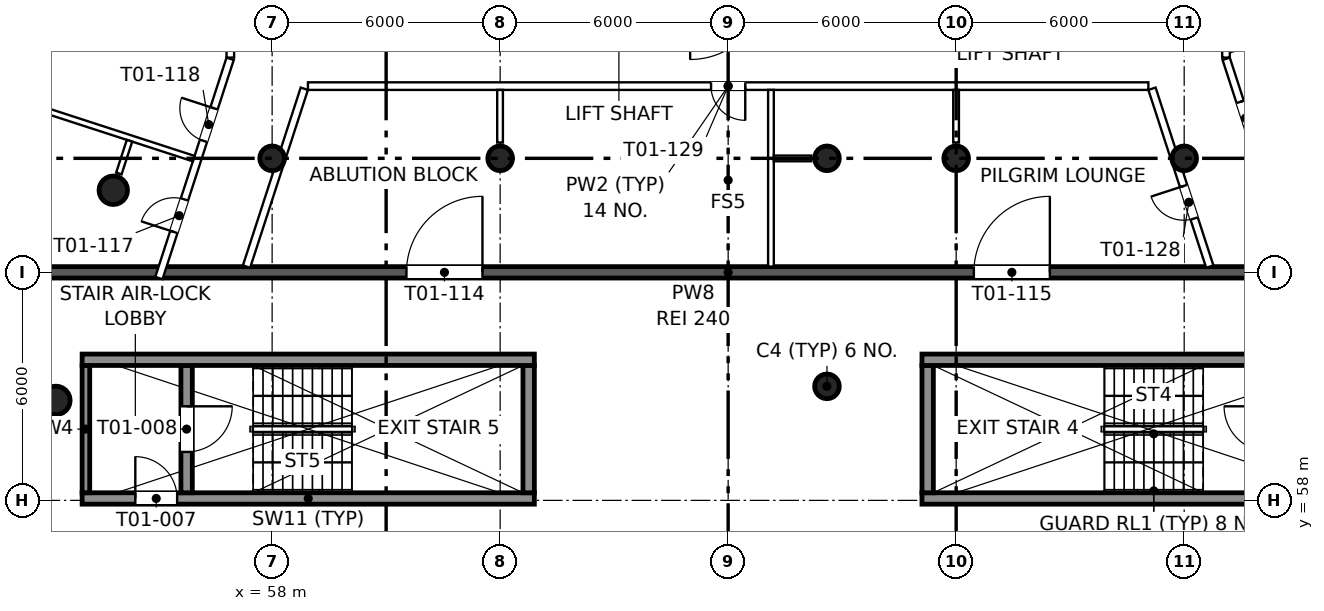
"""IFC4 building model, lengths in metres.
Left out: names, types, materials, properties, quantities, classifications, styles, units other than length and angle.
Written with IfcOpenShell. Run it as: python <this file> out.ifc"""

import sys

from ifc_helpers import new_model, si_unit, direction, frame, frame_2d, origin, origin_2d, place, context, subcontext, project, spatial, rectangle, circle, extrude, element, fill, save


model = new_model("IFC4")
c1 = context("Model", 3, precision=1e-05, world=origin(), true_north=direction((0.0, 1.0)))
c2 = subcontext(c1, "Body", "Model", "MODEL_VIEW")
j1 = project(units=[si_unit("LENGTHUNIT", "METRE"), si_unit("PLANEANGLEUNIT", "RADIAN")], contexts=[c1])
p1 = place(None, origin())
s1 = spatial("IfcSite", under=j1, at=p1, CompositionType="ELEMENT")
p2 = place(p1, origin())
s2 = spatial("IfcBuilding", under=s1, at=p2, CompositionType="ELEMENT")
p3 = place(p2, frame((0.0, 0.0, 39.0)))
s3 = spatial("IfcBuildingStorey", under=s2, at=p3, CompositionType="ELEMENT", Elevation=39.0)
for number, where, z_axis, x_axis in (
    (1, (52.31, 60.63, 0.0), (0.0, 0.0, 1.0), (1.0, 0.0, 0.0)),
    (2, (53.82, 66.16, 0.0), (0.0, 0.0, 1.0), (1.0, 0.0, 0.0)),
):
    element("IfcColumn", number, at=place(p3, frame(where, z_axis=z_axis, x_axis=x_axis)), inside=s3, PredefinedType="COLUMN", context=c2, shape_type="SweptSolid", body=[
        extrude(circle(Radius=0.375, at=origin_2d()), origin(), (0.0, 0.0, 1.0), 3.9),
    ])
for number, where, z_axis, x_axis in (
    (3, (58.0, 67.0, 0.0), (0.0, 0.0, 1.0), (1.0, 0.0, 0.0)),
    (4, (64.0, 67.0, 0.0), (0.0, 0.0, 1.0), (1.0, 0.0, 0.0)),
    (5, (72.6, 61.0, 0.0), (0.0, 0.0, 1.0), (1.0, 0.0, 0.0)),
    (6, (72.6, 67.0, 0.0), (0.0, 0.0, 1.0), (1.0, 0.0, 0.0)),
    (7, (76.0, 67.0, 0.0), (0.0, 0.0, 1.0), (1.0, 0.0, 0.0)),
    (8, (82.0, 67.0, 0.0), (0.0, 0.0, 1.0), (1.0, 0.0, 0.0)),
):
    element("IfcColumn", number, at=place(p3, frame(where, z_axis=z_axis, x_axis=x_axis)), inside=s3, PredefinedType="COLUMN", context=c2, shape_type="SweptSolid", body=[
        extrude(circle(Radius=0.325, at=origin_2d()), origin(), (0.0, 0.0, 1.0), 3.9),
    ])
p4 = place(p3, frame((53.0, 58.05, 0.0), z_axis=(0.0, 0.0, 1.0), x_axis=(1.0, 0.0, 0.0)))
e9 = element("IfcWall", 9, at=p4, inside=s3, PredefinedType="SHEAR", context=c2, shape_type="SweptSolid", body=[
    extrude(rectangle(XDim=11.9, YDim=0.3, at=frame_2d((5.95, 0.0))), origin(), (0.0, 0.0, 1.0), 3.9),
])
p5 = place(p4, frame((1.4, 0.0, 0.0)))
e10 = element("IfcOpeningElement", 10, at=p5, cuts=e9, PredefinedType="OPENING", context=c2, shape_type="SweptSolid", body=[
    extrude(rectangle(XDim=1.1, YDim=2.1, at=frame_2d((0.55, 1.05))), frame((0.0, 0.16, 0.0), z_axis=(0.0, -1.0, 0.0), x_axis=(1.0, 0.0, 0.0)), (0.0, 0.0, 1.0), 0.32),
])
p6 = place(p3, frame((75.1, 58.05, 0.0), z_axis=(0.0, 0.0, 1.0), x_axis=(1.0, 0.0, 0.0)))
e11 = element("IfcWall", 11, at=p6, inside=s3, PredefinedType="SHEAR", context=c2, shape_type="SweptSolid", body=[
    extrude(rectangle(XDim=11.9, YDim=0.3, at=frame_2d((5.95, 0.0))), origin(), (0.0, 0.0, 1.0), 3.9),
])
p7 = place(p6, frame((9.4, 0.0, 0.0)))
e12 = element("IfcOpeningElement", 12, at=p7, cuts=e11, PredefinedType="OPENING", context=c2, shape_type="SweptSolid", body=[
    extrude(rectangle(XDim=1.1, YDim=2.1, at=frame_2d((0.55, 1.05))), frame((0.0, 0.16, 0.0), z_axis=(0.0, -1.0, 0.0), x_axis=(1.0, 0.0, 0.0)), (0.0, 0.0, 1.0), 0.32),
])
p8 = place(p3, frame((53.1, 58.2, 0.0), z_axis=(0.0, 0.0, 1.0), x_axis=(0.0, 1.0, 0.0)))
e13 = element("IfcWall", 13, at=p8, inside=s3, PredefinedType="SHEAR", context=c2, shape_type="SweptSolid", body=[
    extrude(rectangle(XDim=3.35, YDim=0.2, at=frame_2d((1.675, 0.0))), origin(), (0.0, 0.0, 1.0), 3.9),
])
p9 = place(p3, frame((55.75, 58.2, 0.0), z_axis=(0.0, 0.0, 1.0), x_axis=(0.0, 1.0, 0.0)))
e14 = element("IfcWall", 14, at=p9, inside=s3, PredefinedType="SHEAR", context=c2, shape_type="SweptSolid", body=[
    extrude(rectangle(XDim=3.35, YDim=0.3, at=frame_2d((1.675, 0.0))), origin(), (0.0, 0.0, 1.0), 3.9),
])
p10 = place(p9, frame((1.075, 0.0, 0.0)))
e15 = element("IfcOpeningElement", 15, at=p10, cuts=e14, PredefinedType="OPENING", context=c2, shape_type="SweptSolid", body=[
    extrude(rectangle(XDim=1.2, YDim=2.1, at=frame_2d((0.6, 1.05))), frame((0.0, 0.16, 0.0), z_axis=(0.0, -1.0, 0.0), x_axis=(1.0, 0.0, 0.0)), (0.0, 0.0, 1.0), 0.32),
])
for number, where, z_axis, x_axis in (
    (16, (64.75, 58.2, 0.0), (0.0, 0.0, 1.0), (0.0, 1.0, 0.0)),
    (17, (75.25, 58.2, 0.0), (0.0, 0.0, 1.0), (0.0, 1.0, 0.0)),
):
    element("IfcWall", number, at=place(p3, frame(where, z_axis=z_axis, x_axis=x_axis)), inside=s3, PredefinedType="SHEAR", context=c2, shape_type="SweptSolid", body=[
        extrude(rectangle(XDim=3.35, YDim=0.3, at=frame_2d((1.675, 0.0))), origin(), (0.0, 0.0, 1.0), 3.9),
    ])
for number, where, z_axis, x_axis in (
    (18, (53.0, 61.7, 0.0), (0.0, 0.0, 1.0), (1.0, 0.0, 0.0)),
    (19, (75.1, 61.7, 0.0), (0.0, 0.0, 1.0), (1.0, 0.0, 0.0)),
):
    element("IfcWall", number, at=place(p3, frame(where, z_axis=z_axis, x_axis=x_axis)), inside=s3, PredefinedType="SHEAR", context=c2, shape_type="SweptSolid", body=[
        extrude(rectangle(XDim=11.9, YDim=0.3, at=frame_2d((5.95, 0.0))), origin(), (0.0, 0.0, 1.0), 3.9),
    ])
p11 = place(p3, frame((45.101, 64.0, 0.0), z_axis=(0.0, 0.0, 1.0), x_axis=(1.0, 0.0, 0.0)))
e20 = element("IfcWall", 20, at=p11, inside=s3, PredefinedType="PARTITIONING", context=c2, shape_type="SweptSolid", body=[
    extrude(rectangle(XDim=49.797, YDim=0.3, at=frame_2d((24.899, 0.0))), origin(), (0.0, 0.0, 1.0), 2.9),
])
p12 = place(p11, frame((16.433, 0.0, 0.0)))
e21 = element("IfcOpeningElement", 21, at=p12, cuts=e20, PredefinedType="OPENING", context=c2, shape_type="SweptSolid", body=[
    extrude(rectangle(XDim=2.0, YDim=2.1, at=frame_2d((1.0, 1.05))), frame((0.0, 0.16, 0.0), z_axis=(0.0, -1.0, 0.0), x_axis=(1.0, 0.0, 0.0)), (0.0, 0.0, 1.0), 0.32),
])
p13 = place(p11, frame((31.364, 0.0, 0.0)))
e22 = element("IfcOpeningElement", 22, at=p13, cuts=e20, PredefinedType="OPENING", context=c2, shape_type="SweptSolid", body=[
    extrude(rectangle(XDim=2.0, YDim=2.1, at=frame_2d((1.0, 1.05))), frame((0.0, 0.16, 0.0), z_axis=(0.0, -1.0, 0.0), x_axis=(1.0, 0.0, 0.0)), (0.0, 0.0, 1.0), 0.32),
])
p14 = place(p3, frame((55.021, 63.85, 0.0), z_axis=(0.0, 0.0, 1.0), x_axis=(0.309010538589, 0.951058613883, 0.0)))
e23 = element("IfcWall", 23, at=p14, inside=s3, PredefinedType="PARTITIONING", context=c2, shape_type="SweptSolid", body=[
    extrude(rectangle(XDim=6.066, YDim=0.2, at=frame_2d((3.033, 0.0))), origin(), (0.0, 0.0, 1.0), 3.6),
])
p15 = place(p14, frame((1.276, 0.0, 0.0)))
e24 = element("IfcOpeningElement", 24, at=p15, cuts=e23, PredefinedType="OPENING", context=c2, shape_type="SweptSolid", body=[
    extrude(rectangle(XDim=0.9, YDim=2.1, at=frame_2d((0.45, 1.05))), frame((0.0, 0.11, 0.0), z_axis=(0.0, -1.0, 0.0), x_axis=(1.0, 0.0, 0.0)), (0.0, 0.0, 1.0), 0.22),
])
p16 = place(p14, frame((3.796, 0.0, 0.0)))
e25 = element("IfcOpeningElement", 25, at=p16, cuts=e23, PredefinedType="OPENING", context=c2, shape_type="SweptSolid", body=[
    extrude(rectangle(XDim=0.9, YDim=2.1, at=frame_2d((0.45, 1.05))), frame((0.0, 0.11, 0.0), z_axis=(0.0, -1.0, 0.0), x_axis=(1.0, 0.0, 0.0)), (0.0, 0.0, 1.0), 0.22),
])
p17 = place(p3, frame((56.9, 69.65, 0.0), z_axis=(0.0, 0.0, 1.0), x_axis=(0.0, 1.0, 0.0)))
e26 = element("IfcWall", 26, at=p17, inside=s3, PredefinedType="PARTITIONING", context=c2, shape_type="SweptSolid", body=[
    extrude(rectangle(XDim=16.746, YDim=0.2, at=frame_2d((8.373, 0.0))), origin(), (0.0, 0.0, 1.0), 3.0),
])
p18 = place(p17, frame((5.64, 0.0, 0.0)))
e27 = element("IfcOpeningElement", 27, at=p18, cuts=e26, PredefinedType="OPENING", context=c2, shape_type="SweptSolid", body=[
    extrude(rectangle(XDim=0.9, YDim=2.1, at=frame_2d((0.45, 1.05))), frame((0.0, 0.11, 0.0), z_axis=(0.0, -1.0, 0.0), x_axis=(1.0, 0.0, 0.0)), (0.0, 0.0, 1.0), 0.22),
])
p19 = place(p17, frame((10.028, 0.0, 0.0)))
e28 = element("IfcOpeningElement", 28, at=p19, cuts=e26, PredefinedType="OPENING", context=c2, shape_type="SweptSolid", body=[
    extrude(rectangle(XDim=0.9, YDim=2.1, at=frame_2d((0.45, 1.05))), frame((0.0, 0.11, 0.0), z_axis=(0.0, -1.0, 0.0), x_axis=(1.0, 0.0, 0.0)), (0.0, 0.0, 1.0), 0.22),
])
p20 = place(p17, frame((13.784, 0.0, 0.0)))
e29 = element("IfcOpeningElement", 29, at=p20, cuts=e26, PredefinedType="OPENING", context=c2, shape_type="SweptSolid", body=[
    extrude(rectangle(XDim=0.9, YDim=2.1, at=frame_2d((0.45, 1.05))), frame((0.0, 0.11, 0.0), z_axis=(0.0, -1.0, 0.0), x_axis=(1.0, 0.0, 0.0)), (0.0, 0.0, 1.0), 0.22),
])
p21 = place(p3, frame((83.1, 86.396, 0.0), z_axis=(0.0, 0.0, 1.0), x_axis=(0.0, -1.0, 0.0)))
e30 = element("IfcWall", 30, at=p21, inside=s3, PredefinedType="PARTITIONING", context=c2, shape_type="SweptSolid", body=[
    extrude(rectangle(XDim=16.746, YDim=0.2, at=frame_2d((8.373, 0.0))), origin(), (0.0, 0.0, 1.0), 3.0),
])
p22 = place(p21, frame((2.062, 0.0, 0.0)))
e31 = element("IfcOpeningElement", 31, at=p22, cuts=e30, PredefinedType="OPENING", context=c2, shape_type="SweptSolid", body=[
    extrude(rectangle(XDim=0.9, YDim=2.1, at=frame_2d((0.45, 1.05))), frame((0.0, 0.11, 0.0), z_axis=(0.0, -1.0, 0.0), x_axis=(1.0, 0.0, 0.0)), (0.0, 0.0, 1.0), 0.22),
])
p23 = place(p21, frame((5.818, 0.0, 0.0)))
e32 = element("IfcOpeningElement", 32, at=p23, cuts=e30, PredefinedType="OPENING", context=c2, shape_type="SweptSolid", body=[
    extrude(rectangle(XDim=0.9, YDim=2.1, at=frame_2d((0.45, 1.05))), frame((0.0, 0.11, 0.0), z_axis=(0.0, -1.0, 0.0), x_axis=(1.0, 0.0, 0.0)), (0.0, 0.0, 1.0), 0.22),
])
p24 = place(p21, frame((8.498, 0.0, 0.0)))
e33 = element("IfcOpeningElement", 33, at=p24, cuts=e30, PredefinedType="OPENING", context=c2, shape_type="SweptSolid", body=[
    extrude(rectangle(XDim=0.9, YDim=2.1, at=frame_2d((0.45, 1.05))), frame((0.0, 0.11, 0.0), z_axis=(0.0, -1.0, 0.0), x_axis=(1.0, 0.0, 0.0)), (0.0, 0.0, 1.0), 0.22),
])
p25 = place(p3, frame((83.105, 69.619, 0.0), z_axis=(0.0, 0.0, 1.0), x_axis=(0.309010538589, -0.951058613883, 0.0)))
e34 = element("IfcWall", 34, at=p25, inside=s3, PredefinedType="PARTITIONING", context=c2, shape_type="SweptSolid", body=[
    extrude(rectangle(XDim=6.066, YDim=0.2, at=frame_2d((3.033, 0.0))), origin(), (0.0, 0.0, 1.0), 3.6),
])
p26 = place(p25, frame((1.193, 0.0, 0.0)))
e35 = element("IfcOpeningElement", 35, at=p26, cuts=e34, PredefinedType="OPENING", context=c2, shape_type="SweptSolid", body=[
    extrude(rectangle(XDim=0.9, YDim=2.1, at=frame_2d((0.45, 1.05))), frame((0.0, 0.11, 0.0), z_axis=(0.0, -1.0, 0.0), x_axis=(1.0, 0.0, 0.0)), (0.0, 0.0, 1.0), 0.22),
])
p27 = place(p25, frame((3.89, 0.0, 0.0)))
e36 = element("IfcOpeningElement", 36, at=p27, cuts=e34, PredefinedType="OPENING", context=c2, shape_type="SweptSolid", body=[
    extrude(rectangle(XDim=0.9, YDim=2.1, at=frame_2d((0.45, 1.05))), frame((0.0, 0.11, 0.0), z_axis=(0.0, -1.0, 0.0), x_axis=(1.0, 0.0, 0.0)), (0.0, 0.0, 1.0), 0.22),
])
p28 = place(p3, frame((81.058, 68.9, 0.0), z_axis=(0.0, 0.0, 1.0), x_axis=(-1.0, 0.0, 0.0)))
e37 = element("IfcWall", 37, at=p28, inside=s3, PredefinedType="PARTITIONING", context=c2, shape_type="SweptSolid", body=[
    extrude(rectangle(XDim=22.116, YDim=0.2, at=frame_2d((11.058, 0.0))), origin(), (0.0, 0.0, 1.0), 3.6),
])
p29 = place(p28, frame((10.608, 0.0, 0.0)))
e38 = element("IfcOpeningElement", 38, at=p29, cuts=e37, PredefinedType="OPENING", context=c2, shape_type="SweptSolid", body=[
    extrude(rectangle(XDim=0.9, YDim=2.1, at=frame_2d((0.45, 1.05))), frame((0.0, 0.11, 0.0), z_axis=(0.0, -1.0, 0.0), x_axis=(1.0, 0.0, 0.0)), (0.0, 0.0, 1.0), 0.22),
])
p30 = place(p3, frame((58.847, 68.831, 0.0), z_axis=(0.0, 0.0, 1.0), x_axis=(-0.309031112369, -0.951051928965, 0.0)))
e39 = element("IfcWall", 39, at=p30, inside=s3, PredefinedType="PARTITIONING", context=c2, shape_type="SweptSolid", body=[
    extrude(rectangle(XDim=4.922, YDim=0.2, at=frame_2d((2.461, 0.0))), origin(), (0.0, 0.0, 1.0), 3.6),
])
p31 = place(p3, frame((82.674, 64.15, 0.0), z_axis=(0.0, 0.0, 1.0), x_axis=(-0.309031112369, 0.951051928965, 0.0)))
e40 = element("IfcWall", 40, at=p31, inside=s3, PredefinedType="PARTITIONING", context=c2, shape_type="SweptSolid", body=[
    extrude(rectangle(XDim=4.922, YDim=0.2, at=frame_2d((2.461, 0.0))), origin(), (0.0, 0.0, 1.0), 3.6),
])
p32 = place(p31, frame((1.331, 0.0, 0.0)))
e41 = element("IfcOpeningElement", 41, at=p32, cuts=e40, PredefinedType="OPENING", context=c2, shape_type="SweptSolid", body=[
    extrude(rectangle(XDim=0.9, YDim=2.1, at=frame_2d((0.45, 1.05))), frame((0.0, 0.11, 0.0), z_axis=(0.0, -1.0, 0.0), x_axis=(1.0, 0.0, 0.0)), (0.0, 0.0, 1.0), 0.22),
])
p33 = place(p3, frame((47.015, 69.891, 0.0), z_axis=(0.0, 0.0, 1.0), x_axis=(0.951060843481, -0.309003676349, 0.0)))
e42 = element("IfcWall", 42, at=p33, inside=s3, PredefinedType="PARTITIONING", context=c2, shape_type="SweptSolid", body=[
    extrude(rectangle(XDim=9.38, YDim=0.15, at=frame_2d((4.69, 0.0))), origin(), (0.0, 0.0, 1.0), 3.0),
])
p34 = place(p3, frame((71.126, 64.15, 0.0), z_axis=(0.0, 0.0, 1.0), x_axis=(0.0, 1.0, 0.0)))
e43 = element("IfcWall", 43, at=p34, inside=s3, PredefinedType="PARTITIONING", context=c2, shape_type="SweptSolid", body=[
    extrude(rectangle(XDim=4.65, YDim=0.15, at=frame_2d((2.325, 0.0))), origin(), (0.0, 0.0, 1.0), 3.6),
])
p35 = place(p3, frame((53.967, 66.601, 0.0), z_axis=(0.0, 0.0, 1.0), x_axis=(0.308939772629, 0.951081603695, 0.0)))
e44 = element("IfcWall", 44, at=p35, inside=s3, PredefinedType="PARTITIONING", context=c2, shape_type="SweptSolid", body=[
    extrude(rectangle(XDim=0.906, YDim=0.15, at=frame_2d((0.453, 0.0))), origin(), (0.0, 0.0, 1.0), 3.0),
])
p36 = place(p3, frame((63.998, 67.415, 0.0), z_axis=(0.0, 0.0, 1.0), x_axis=(0.0, 1.0, 0.0)))
e45 = element("IfcWall", 45, at=p36, inside=s3, PredefinedType="PARTITIONING", context=c2, shape_type="SweptSolid", body=[
    extrude(rectangle(XDim=1.385, YDim=0.15, at=frame_2d((0.692, 0.0))), origin(), (0.0, 0.0, 1.0), 3.6),
])
p37 = place(p3, frame((72.185, 66.998, 0.0), z_axis=(0.0, 0.0, 1.0), x_axis=(-1.0, 0.0, 0.0)))
e46 = element("IfcWall", 46, at=p37, inside=s3, PredefinedType="PARTITIONING", context=c2, shape_type="SweptSolid", body=[
    extrude(rectangle(XDim=0.984, YDim=0.15, at=frame_2d((0.492, 0.0))), origin(), (0.0, 0.0, 1.0), 3.6),
])
p38 = place(p3, frame((75.998, 67.415, 0.0), z_axis=(0.0, 0.0, 1.0), x_axis=(0.0, 1.0, 0.0)))
e47 = element("IfcWall", 47, at=p38, inside=s3, PredefinedType="PARTITIONING", context=c2, shape_type="SweptSolid", body=[
    extrude(rectangle(XDim=1.385, YDim=0.15, at=frame_2d((0.692, 0.0))), origin(), (0.0, 0.0, 1.0), 3.6),
])
p39 = place(p5, origin())
e48 = element("IfcDoor", 48, at=p39, inside=s3, OperationType="SINGLE_SWING_LEFT", PredefinedType="DOOR", context=c2, shape_type="SweptSolid", body=[
    extrude(rectangle(XDim=1.1, YDim=2.1, at=frame_2d((0.55, 1.05))), frame((0.0, 0.025, 0.0), z_axis=(0.0, -1.0, 0.0), x_axis=(1.0, 0.0, 0.0)), (0.0, 0.0, 1.0), 0.05),
])
fill(e10, e48)
p40 = place(p10, frame((1.2, 0.0, 0.0), z_axis=(0.0, 0.0, 1.0), x_axis=(-1.0, 0.0, 0.0)))
e49 = element("IfcDoor", 49, at=p40, inside=s3, OperationType="SINGLE_SWING_LEFT", PredefinedType="DOOR", context=c2, shape_type="SweptSolid", body=[
    extrude(rectangle(XDim=1.2, YDim=2.1, at=frame_2d((0.6, 1.05))), frame((0.0, 0.025, 0.0), z_axis=(0.0, -1.0, 0.0), x_axis=(1.0, 0.0, 0.0)), (0.0, 0.0, 1.0), 0.05),
])
fill(e15, e49)
p41 = place(p12, origin())
e50 = element("IfcDoor", 50, at=p41, inside=s3, OperationType="DOUBLE_DOOR_SINGLE_SWING", PredefinedType="DOOR", context=c2, shape_type="SweptSolid", body=[
    extrude(rectangle(XDim=2.0, YDim=2.1, at=frame_2d((1.0, 1.05))), frame((0.0, 0.025, 0.0), z_axis=(0.0, -1.0, 0.0), x_axis=(1.0, 0.0, 0.0)), (0.0, 0.0, 1.0), 0.05),
])
fill(e21, e50)
p42 = place(p13, origin())
e51 = element("IfcDoor", 51, at=p42, inside=s3, OperationType="DOUBLE_DOOR_SINGLE_SWING", PredefinedType="DOOR", context=c2, shape_type="SweptSolid", body=[
    extrude(rectangle(XDim=2.0, YDim=2.1, at=frame_2d((1.0, 1.05))), frame((0.0, 0.025, 0.0), z_axis=(0.0, -1.0, 0.0), x_axis=(1.0, 0.0, 0.0)), (0.0, 0.0, 1.0), 0.05),
])
fill(e22, e51)
p43 = place(p15, origin())
e52 = element("IfcDoor", 52, at=p43, inside=s3, OperationType="SINGLE_SWING_LEFT", PredefinedType="DOOR", context=c2, shape_type="SweptSolid", body=[
    extrude(rectangle(XDim=0.9, YDim=2.1, at=frame_2d((0.45, 1.05))), frame((0.0, 0.025, 0.0), z_axis=(0.0, -1.0, 0.0), x_axis=(1.0, 0.0, 0.0)), (0.0, 0.0, 1.0), 0.05),
])
fill(e24, e52)
p44 = place(p16, origin())
e53 = element("IfcDoor", 53, at=p44, inside=s3, OperationType="SINGLE_SWING_RIGHT", PredefinedType="DOOR", context=c2, shape_type="SweptSolid", body=[
    extrude(rectangle(XDim=0.9, YDim=2.1, at=frame_2d((0.45, 1.05))), frame((0.0, 0.025, 0.0), z_axis=(0.0, -1.0, 0.0), x_axis=(1.0, 0.0, 0.0)), (0.0, 0.0, 1.0), 0.05),
])
fill(e25, e53)
p45 = place(p26, origin())
e54 = element("IfcDoor", 54, at=p45, inside=s3, OperationType="SINGLE_SWING_LEFT", PredefinedType="DOOR", context=c2, shape_type="SweptSolid", body=[
    extrude(rectangle(XDim=0.9, YDim=2.1, at=frame_2d((0.45, 1.05))), frame((0.0, 0.025, 0.0), z_axis=(0.0, -1.0, 0.0), x_axis=(1.0, 0.0, 0.0)), (0.0, 0.0, 1.0), 0.05),
])
fill(e35, e54)
p46 = place(p32, origin())
e55 = element("IfcDoor", 55, at=p46, inside=s3, OperationType="SINGLE_SWING_RIGHT", PredefinedType="DOOR", context=c2, shape_type="SweptSolid", body=[
    extrude(rectangle(XDim=0.9, YDim=2.1, at=frame_2d((0.45, 1.05))), frame((0.0, 0.025, 0.0), z_axis=(0.0, -1.0, 0.0), x_axis=(1.0, 0.0, 0.0)), (0.0, 0.0, 1.0), 0.05),
])
fill(e41, e55)
p47 = place(p29, origin())
e56 = element("IfcDoor", 56, at=p47, inside=s3, OperationType="SINGLE_SWING_LEFT", PredefinedType="DOOR", context=c2, shape_type="SweptSolid", body=[
    extrude(rectangle(XDim=0.9, YDim=2.1, at=frame_2d((0.45, 1.05))), frame((0.0, 0.025, 0.0), z_axis=(0.0, -1.0, 0.0), x_axis=(1.0, 0.0, 0.0)), (0.0, 0.0, 1.0), 0.05),
])
fill(e38, e56)
save(model, sys.argv[1])
